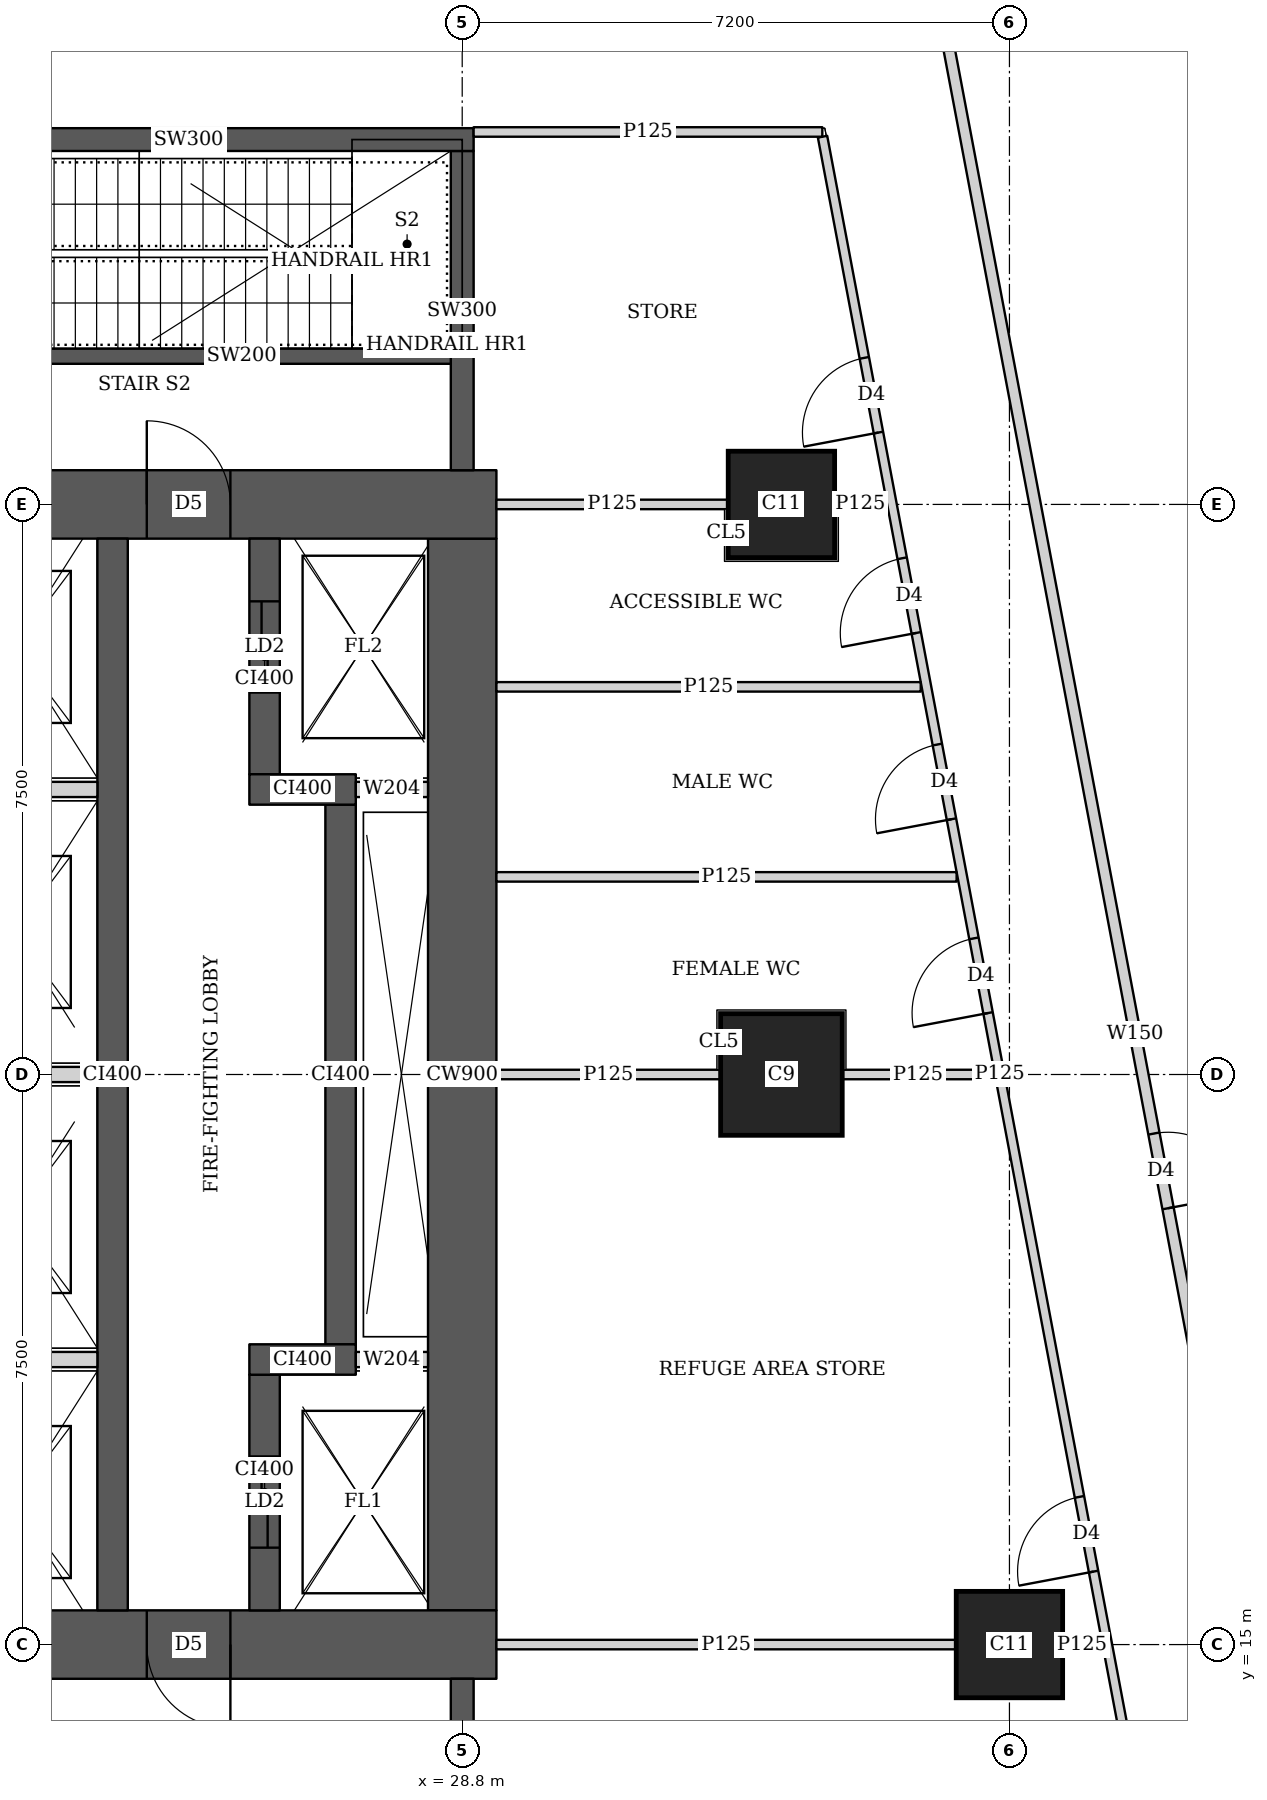
"""IFC4 building model, lengths in metres.
Left out: names, types, materials, properties, quantities, classifications, styles, units other than length and angle.
Written with IfcOpenShell. Run it as: python <this file> out.ifc"""

import sys

from ifc_helpers import new_model, si_unit, direction, frame, frame_2d, origin, origin_2d, place, context, subcontext, project, spatial, rectangle, extrude, element, fill, save


model = new_model("IFC4")
c1 = context("Model", 3, precision=1e-05, world=origin(), true_north=direction((0.0, 1.0)))
c2 = subcontext(c1, "Body", "Model", "MODEL_VIEW")
j1 = project(units=[si_unit("LENGTHUNIT", "METRE"), si_unit("PLANEANGLEUNIT", "RADIAN")], contexts=[c1])
p1 = place(None, origin())
s1 = spatial("IfcSite", under=j1, at=p1, CompositionType="ELEMENT")
p2 = place(p1, origin())
s2 = spatial("IfcBuilding", under=s1, at=p2, CompositionType="ELEMENT")
p3 = place(p2, frame((0.0, 0.0, 246.2)))
s3 = spatial("IfcBuildingStorey", under=s2, at=p3, CompositionType="ELEMENT", Elevation=246.2)
p4 = place(p3, frame((36.0, 15.0, 0.0), z_axis=(0.0, 0.0, 1.0), x_axis=(1.0, 0.0, 0.0)))
e1 = element("IfcColumn", 1, at=p4, inside=s3, PredefinedType="COLUMN", context=c2, shape_type="SweptSolid", body=[
    extrude(rectangle(XDim=1.4, YDim=1.4, at=origin_2d()), origin(), (0.0, 0.0, 1.0), 5.4),
])
p5 = place(p3, frame((33.0, 22.5, 0.0), z_axis=(0.0, 0.0, 1.0), x_axis=(1.0, 0.0, 0.0)))
e2 = element("IfcColumn", 2, at=p5, inside=s3, PredefinedType="COLUMN", context=c2, shape_type="SweptSolid", body=[
    extrude(rectangle(XDim=1.6, YDim=1.6, at=origin_2d()), origin(), (0.0, 0.0, 1.0), 5.4),
])
p6 = place(p3, frame((33.0, 30.0, 0.0), z_axis=(0.0, 0.0, 1.0), x_axis=(1.0, 0.0, 0.0)))
e3 = element("IfcColumn", 3, at=p6, inside=s3, PredefinedType="COLUMN", context=c2, shape_type="SweptSolid", body=[
    extrude(rectangle(XDim=1.4, YDim=1.4, at=origin_2d()), origin(), (0.0, 0.0, 1.0), 5.4),
])
p7 = place(p3, frame((13.95, 15.0, 0.0), z_axis=(0.0, 0.0, 1.0), x_axis=(1.0, 0.0, 0.0)))
e4 = element("IfcWall", 4, at=p7, inside=s3, PredefinedType="SHEAR", context=c2, shape_type="SweptSolid", body=[
    extrude(rectangle(XDim=15.3, YDim=0.9, at=frame_2d((7.65, 0.0))), origin(), (0.0, 0.0, 1.0), 5.4),
])
p8 = place(p7, frame((4.45, 0.0, 0.0)))
e5 = element("IfcOpeningElement", 5, at=p8, cuts=e4, PredefinedType="OPENING", context=c2, shape_type="SweptSolid", body=[
    extrude(rectangle(XDim=1.8, YDim=2.1, at=frame_2d((0.9, 1.05))), frame((0.0, 0.46, 0.0), z_axis=(0.0, -1.0, 0.0), x_axis=(1.0, 0.0, 0.0)), (0.0, 0.0, 1.0), 0.92),
])
p9 = place(p7, frame((10.7, 0.0, 0.0)))
e6 = element("IfcOpeningElement", 6, at=p9, cuts=e4, PredefinedType="OPENING", context=c2, shape_type="SweptSolid", body=[
    extrude(rectangle(XDim=1.1, YDim=2.1, at=frame_2d((0.55, 1.05))), frame((0.0, 0.46, 0.0), z_axis=(0.0, -1.0, 0.0), x_axis=(1.0, 0.0, 0.0)), (0.0, 0.0, 1.0), 0.92),
])
p10 = place(p3, frame((13.95, 30.0, 0.0), z_axis=(0.0, 0.0, 1.0), x_axis=(1.0, 0.0, 0.0)))
e7 = element("IfcWall", 7, at=p10, inside=s3, PredefinedType="SHEAR", context=c2, shape_type="SweptSolid", body=[
    extrude(rectangle(XDim=15.3, YDim=0.9, at=frame_2d((7.65, 0.0))), origin(), (0.0, 0.0, 1.0), 5.4),
])
p11 = place(p10, frame((4.45, 0.0, 0.0)))
e8 = element("IfcOpeningElement", 8, at=p11, cuts=e7, PredefinedType="OPENING", context=c2, shape_type="SweptSolid", body=[
    extrude(rectangle(XDim=1.8, YDim=2.1, at=frame_2d((0.9, 1.05))), frame((0.0, 0.46, 0.0), z_axis=(0.0, -1.0, 0.0), x_axis=(1.0, 0.0, 0.0)), (0.0, 0.0, 1.0), 0.92),
])
p12 = place(p10, frame((10.7, 0.0, 0.0)))
e9 = element("IfcOpeningElement", 9, at=p12, cuts=e7, PredefinedType="OPENING", context=c2, shape_type="SweptSolid", body=[
    extrude(rectangle(XDim=1.1, YDim=2.1, at=frame_2d((0.55, 1.05))), frame((0.0, 0.46, 0.0), z_axis=(0.0, -1.0, 0.0), x_axis=(1.0, 0.0, 0.0)), (0.0, 0.0, 1.0), 0.92),
])
p13 = place(p3, frame((28.8, 15.45, 0.0), z_axis=(0.0, 0.0, 1.0), x_axis=(0.0, 1.0, 0.0)))
e10 = element("IfcWall", 10, at=p13, inside=s3, PredefinedType="SHEAR", context=c2, shape_type="SweptSolid", body=[
    extrude(rectangle(XDim=14.1, YDim=0.9, at=frame_2d((7.05, 0.0))), origin(), (0.0, 0.0, 1.0), 5.4),
])
p14 = place(p3, frame((24.2, 15.45, 0.0), z_axis=(0.0, 0.0, 1.0), x_axis=(0.0, 1.0, 0.0)))
e11 = element("IfcWall", 11, at=p14, inside=s3, PredefinedType="SHEAR", context=c2, shape_type="SweptSolid", body=[
    extrude(rectangle(XDim=14.1, YDim=0.4, at=frame_2d((7.05, 0.0))), origin(), (0.0, 0.0, 1.0), 5.4),
])
p15 = place(p3, frame((26.2, 15.45, 0.0), z_axis=(0.0, 0.0, 1.0), x_axis=(0.0, 1.0, 0.0)))
e12 = element("IfcWall", 12, at=p15, inside=s3, PredefinedType="SHEAR", context=c2, shape_type="SweptSolid", body=[
    extrude(rectangle(XDim=3.1, YDim=0.4, at=frame_2d((1.55, 0.0))), origin(), (0.0, 0.0, 1.0), 5.4),
])
p16 = place(p15, frame((0.825, 0.0, 0.0)))
e13 = element("IfcOpeningElement", 13, at=p16, cuts=e12, PredefinedType="OPENING", context=c2, shape_type="SweptSolid", body=[
    extrude(rectangle(XDim=1.2, YDim=2.1, at=frame_2d((0.6, 1.05))), frame((0.0, 0.21, 0.0), z_axis=(0.0, -1.0, 0.0), x_axis=(1.0, 0.0, 0.0)), (0.0, 0.0, 1.0), 0.42),
])
p17 = place(p3, frame((26.0, 18.75, 0.0), z_axis=(0.0, 0.0, 1.0), x_axis=(1.0, 0.0, 0.0)))
e14 = element("IfcWall", 14, at=p17, inside=s3, PredefinedType="SHEAR", context=c2, shape_type="SweptSolid", body=[
    extrude(rectangle(XDim=1.4, YDim=0.4, at=frame_2d((0.7, 0.0))), origin(), (0.0, 0.0, 1.0), 5.4),
])
p18 = place(p3, frame((27.2, 18.95, 0.0), z_axis=(0.0, 0.0, 1.0), x_axis=(0.0, 1.0, 0.0)))
e15 = element("IfcWall", 15, at=p18, inside=s3, PredefinedType="SHEAR", context=c2, shape_type="SweptSolid", body=[
    extrude(rectangle(XDim=7.1, YDim=0.4, at=frame_2d((3.55, 0.0))), origin(), (0.0, 0.0, 1.0), 5.4),
])
p19 = place(p3, frame((26.0, 26.25, 0.0), z_axis=(0.0, 0.0, 1.0), x_axis=(1.0, 0.0, 0.0)))
e16 = element("IfcWall", 16, at=p19, inside=s3, PredefinedType="SHEAR", context=c2, shape_type="SweptSolid", body=[
    extrude(rectangle(XDim=1.4, YDim=0.4, at=frame_2d((0.7, 0.0))), origin(), (0.0, 0.0, 1.0), 5.4),
])
p20 = place(p3, frame((26.2, 26.45, 0.0), z_axis=(0.0, 0.0, 1.0), x_axis=(0.0, 1.0, 0.0)))
e17 = element("IfcWall", 17, at=p20, inside=s3, PredefinedType="SHEAR", context=c2, shape_type="SweptSolid", body=[
    extrude(rectangle(XDim=3.1, YDim=0.4, at=frame_2d((1.55, 0.0))), origin(), (0.0, 0.0, 1.0), 5.4),
])
p21 = place(p20, frame((1.075, 0.0, 0.0)))
e18 = element("IfcOpeningElement", 18, at=p21, cuts=e17, PredefinedType="OPENING", context=c2, shape_type="SweptSolid", body=[
    extrude(rectangle(XDim=1.2, YDim=2.1, at=frame_2d((0.6, 1.05))), frame((0.0, 0.21, 0.0), z_axis=(0.0, -1.0, 0.0), x_axis=(1.0, 0.0, 0.0)), (0.0, 0.0, 1.0), 0.42),
])
p22 = place(p3, frame((28.8, 10.35, 0.0), z_axis=(0.0, 0.0, 1.0), x_axis=(0.0, 1.0, 0.0)))
e19 = element("IfcWall", 19, at=p22, inside=s3, PredefinedType="SHEAR", context=c2, shape_type="SweptSolid", body=[
    extrude(rectangle(XDim=4.2, YDim=0.3, at=frame_2d((2.1, 0.0))), origin(), (0.0, 0.0, 1.0), 5.4),
])
p23 = place(p3, frame((21.45, 34.8, 0.0), z_axis=(0.0, 0.0, 1.0), x_axis=(1.0, 0.0, 0.0)))
e20 = element("IfcWall", 20, at=p23, inside=s3, PredefinedType="SHEAR", context=c2, shape_type="SweptSolid", body=[
    extrude(rectangle(XDim=7.5, YDim=0.3, at=frame_2d((3.75, 0.0))), origin(), (0.0, 0.0, 1.0), 5.4),
])
p24 = place(p23, frame((0.5, 0.0, 0.0)))
e21 = element("IfcOpeningElement", 21, at=p24, cuts=e20, PredefinedType="OPENING", context=c2, shape_type="SweptSolid", body=[
    extrude(rectangle(XDim=1.1, YDim=2.1, at=frame_2d((0.55, 1.05))), frame((0.0, 0.16, 0.0), z_axis=(0.0, -1.0, 0.0), x_axis=(1.0, 0.0, 0.0)), (0.0, 0.0, 1.0), 0.32),
])
p25 = place(p3, frame((28.8, 30.45, 0.0), z_axis=(0.0, 0.0, 1.0), x_axis=(0.0, 1.0, 0.0)))
e22 = element("IfcWall", 22, at=p25, inside=s3, PredefinedType="SHEAR", context=c2, shape_type="SweptSolid", body=[
    extrude(rectangle(XDim=4.2, YDim=0.3, at=frame_2d((2.1, 0.0))), origin(), (0.0, 0.0, 1.0), 5.4),
])
p26 = place(p3, frame((33.382, 45.65, 0.0), z_axis=(0.0, 0.0, 1.0), x_axis=(0.185582712124, -0.982628646519, 0.0)))
e23 = element("IfcWall", 23, at=p26, inside=s3, PredefinedType="SOLIDWALL", context=c2, shape_type="SweptSolid", body=[
    extrude(rectangle(XDim=46.044, YDim=0.15, at=frame_2d((23.022, 0.0))), origin(), (0.0, 0.0, 1.0), 3.35),
])
p27 = place(p26, frame((24.35, 0.0, 0.0)))
e24 = element("IfcOpeningElement", 24, at=p27, cuts=e23, PredefinedType="OPENING", context=c2, shape_type="SweptSolid", body=[
    extrude(rectangle(XDim=1.0, YDim=2.1, at=frame_2d((0.5, 1.05))), frame((0.0, 0.085, 0.0), z_axis=(0.0, -1.0, 0.0), x_axis=(1.0, 0.0, 0.0)), (0.0, 0.0, 1.0), 0.17),
])
p28 = place(p3, frame((28.95, 34.9, 0.0), z_axis=(0.0, 0.0, 1.0), x_axis=(1.0, 0.0, 0.0)))
e25 = element("IfcWall", 25, at=p28, inside=s3, PredefinedType="PARTITIONING", context=c2, shape_type="SweptSolid", body=[
    extrude(rectangle(XDim=4.588, YDim=0.125, at=frame_2d((2.294, 0.0))), origin(), (0.0, 0.0, 1.0), 2.75),
])
p29 = place(p3, frame((38.202, 10.163, 0.0), z_axis=(0.0, 0.0, 1.0), x_axis=(-0.185610321132, 0.982623431783, 0.0)))
e26 = element("IfcWall", 26, at=p29, inside=s3, PredefinedType="PARTITIONING", context=c2, shape_type="SweptSolid", body=[
    extrude(rectangle(XDim=25.111, YDim=0.125, at=frame_2d((12.556, 0.0))), origin(), (0.0, 0.0, 1.0), 3.55),
])
p30 = place(p29, frame((0.708, 0.0, 0.0)))
e27 = element("IfcOpeningElement", 27, at=p30, cuts=e26, PredefinedType="OPENING", context=c2, shape_type="SweptSolid", body=[
    extrude(rectangle(XDim=1.0, YDim=2.1, at=frame_2d((0.5, 1.05))), frame((0.0, 0.073, 0.0), z_axis=(0.0, -1.0, 0.0), x_axis=(1.0, 0.0, 0.0)), (0.0, 0.0, 1.0), 0.145),
])
p31 = place(p29, frame((5.9, 0.0, 0.0)))
e28 = element("IfcOpeningElement", 28, at=p31, cuts=e26, PredefinedType="OPENING", context=c2, shape_type="SweptSolid", body=[
    extrude(rectangle(XDim=1.0, YDim=2.1, at=frame_2d((0.5, 1.05))), frame((0.0, 0.073, 0.0), z_axis=(0.0, -1.0, 0.0), x_axis=(1.0, 0.0, 0.0)), (0.0, 0.0, 1.0), 0.145),
])
p32 = place(p29, frame((21.15, 0.0, 0.0)))
e29 = element("IfcOpeningElement", 29, at=p32, cuts=e26, PredefinedType="OPENING", context=c2, shape_type="SweptSolid", body=[
    extrude(rectangle(XDim=1.0, YDim=2.1, at=frame_2d((0.5, 1.05))), frame((0.0, 0.073, 0.0), z_axis=(0.0, -1.0, 0.0), x_axis=(1.0, 0.0, 0.0)), (0.0, 0.0, 1.0), 0.145),
])
p33 = place(p29, frame((13.378, 0.0, 0.0)))
e30 = element("IfcOpeningElement", 30, at=p33, cuts=e26, PredefinedType="OPENING", context=c2, shape_type="SweptSolid", body=[
    extrude(rectangle(XDim=1.0, YDim=2.1, at=frame_2d((0.5, 1.05))), frame((0.0, 0.073, 0.0), z_axis=(0.0, -1.0, 0.0), x_axis=(1.0, 0.0, 0.0)), (0.0, 0.0, 1.0), 0.145),
])
p34 = place(p29, frame((15.973, 0.0, 0.0)))
e31 = element("IfcOpeningElement", 31, at=p34, cuts=e26, PredefinedType="OPENING", context=c2, shape_type="SweptSolid", body=[
    extrude(rectangle(XDim=1.0, YDim=2.1, at=frame_2d((0.5, 1.05))), frame((0.0, 0.073, 0.0), z_axis=(0.0, -1.0, 0.0), x_axis=(1.0, 0.0, 0.0)), (0.0, 0.0, 1.0), 0.145),
])
p35 = place(p29, frame((18.467, 0.0, 0.0)))
e32 = element("IfcOpeningElement", 32, at=p35, cuts=e26, PredefinedType="OPENING", context=c2, shape_type="SweptSolid", body=[
    extrude(rectangle(XDim=1.0, YDim=2.1, at=frame_2d((0.5, 1.05))), frame((0.0, 0.073, 0.0), z_axis=(0.0, -1.0, 0.0), x_axis=(1.0, 0.0, 0.0)), (0.0, 0.0, 1.0), 0.145),
])
p36 = place(p3, frame((29.25, 15.0, 0.0), z_axis=(0.0, 0.0, 1.0), x_axis=(1.0, 0.0, 0.0)))
e33 = element("IfcWall", 33, at=p36, inside=s3, PredefinedType="PARTITIONING", context=c2, shape_type="SweptSolid", body=[
    extrude(rectangle(XDim=6.049, YDim=0.125, at=frame_2d((3.024, 0.0))), origin(), (0.0, 0.0, 1.0), 3.55),
])
p37 = place(p3, frame((36.701, 15.0, 0.0), z_axis=(0.0, 0.0, 1.0), x_axis=(1.0, 0.0, 0.0)))
e34 = element("IfcWall", 34, at=p37, inside=s3, PredefinedType="PARTITIONING", context=c2, shape_type="SweptSolid", body=[
    extrude(rectangle(XDim=0.512, YDim=0.125, at=frame_2d((0.256, 0.0))), origin(), (0.0, 0.0, 1.0), 3.55),
])
p38 = place(p3, frame((29.25, 22.5, 0.0), z_axis=(0.0, 0.0, 1.0), x_axis=(1.0, 0.0, 0.0)))
e35 = element("IfcWall", 35, at=p38, inside=s3, PredefinedType="PARTITIONING", context=c2, shape_type="SweptSolid", body=[
    extrude(rectangle(XDim=2.949, YDim=0.125, at=frame_2d((1.475, 0.0))), origin(), (0.0, 0.0, 1.0), 3.55),
])
p39 = place(p3, frame((33.801, 22.5, 0.0), z_axis=(0.0, 0.0, 1.0), x_axis=(1.0, 0.0, 0.0)))
e36 = element("IfcWall", 36, at=p39, inside=s3, PredefinedType="PARTITIONING", context=c2, shape_type="SweptSolid", body=[
    extrude(rectangle(XDim=1.995, YDim=0.125, at=frame_2d((0.998, 0.0))), origin(), (0.0, 0.0, 1.0), 3.55),
])
p40 = place(p3, frame((29.25, 30.0, 0.0), z_axis=(0.0, 0.0, 1.0), x_axis=(1.0, 0.0, 0.0)))
e37 = element("IfcWall", 37, at=p40, inside=s3, PredefinedType="PARTITIONING", context=c2, shape_type="SweptSolid", body=[
    extrude(rectangle(XDim=3.049, YDim=0.125, at=frame_2d((1.524, 0.0))), origin(), (0.0, 0.0, 1.0), 3.55),
])
p41 = place(p3, frame((33.701, 30.0, 0.0), z_axis=(0.0, 0.0, 1.0), x_axis=(1.0, 0.0, 0.0)))
e38 = element("IfcWall", 38, at=p41, inside=s3, PredefinedType="PARTITIONING", context=c2, shape_type="SweptSolid", body=[
    extrude(rectangle(XDim=0.678, YDim=0.125, at=frame_2d((0.339, 0.0))), origin(), (0.0, 0.0, 1.0), 3.55),
])
p42 = place(p3, frame((29.25, 25.1, 0.0), z_axis=(0.0, 0.0, 1.0), x_axis=(1.0, 0.0, 0.0)))
e39 = element("IfcWall", 39, at=p42, inside=s3, PredefinedType="PARTITIONING", context=c2, shape_type="SweptSolid", body=[
    extrude(rectangle(XDim=6.055, YDim=0.125, at=frame_2d((3.027, 0.0))), origin(), (0.0, 0.0, 1.0), 5.15),
])
p43 = place(p3, frame((29.25, 27.6, 0.0), z_axis=(0.0, 0.0, 1.0), x_axis=(1.0, 0.0, 0.0)))
e40 = element("IfcWall", 40, at=p43, inside=s3, PredefinedType="PARTITIONING", context=c2, shape_type="SweptSolid", body=[
    extrude(rectangle(XDim=5.583, YDim=0.125, at=frame_2d((2.792, 0.0))), origin(), (0.0, 0.0, 1.0), 5.15),
])
p44 = place(p3, frame((23.0, 31.95, 0.0), z_axis=(0.0, 0.0, 1.0), x_axis=(1.0, 0.0, 0.0)))
e41 = element("IfcWall", 41, at=p44, inside=s3, PredefinedType="SHEAR", context=c2, shape_type="SweptSolid", body=[
    extrude(rectangle(XDim=5.8, YDim=0.2, at=frame_2d((2.9, 0.0))), origin(), (0.0, 0.0, 1.0), 5.4),
])
for number, where, z_axis, x_axis in (
    (42, (21.8, 18.75, 0.0), (0.0, 0.0, 1.0), (1.0, 0.0, 0.0)),
    (43, (21.8, 22.5, 0.0), (0.0, 0.0, 1.0), (1.0, 0.0, 0.0)),
    (44, (21.8, 26.25, 0.0), (0.0, 0.0, 1.0), (1.0, 0.0, 0.0)),
):
    element("IfcWall", number, at=place(p3, frame(where, z_axis=z_axis, x_axis=x_axis)), inside=s3, PredefinedType="SOLIDWALL", context=c2, shape_type="SweptSolid", body=[
        extrude(rectangle(XDim=2.2, YDim=0.2, at=frame_2d((1.1, 0.0))), origin(), (0.0, 0.0, 1.0), 5.15),
    ])
for number, where, z_axis, x_axis in (
    (45, (27.4, 18.75, 0.0), (0.0, 0.0, 1.0), (1.0, 0.0, 0.0)),
    (46, (27.4, 26.25, 0.0), (0.0, 0.0, 1.0), (1.0, 0.0, 0.0)),
):
    element("IfcWall", number, at=place(p3, frame(where, z_axis=z_axis, x_axis=x_axis)), inside=s3, PredefinedType="SOLIDWALL", context=c2, shape_type="SweptSolid", body=[
        extrude(rectangle(XDim=0.95, YDim=0.2, at=frame_2d((0.475, 0.0))), origin(), (0.0, 0.0, 1.0), 5.15),
    ])
p45 = place(p27, origin())
e47 = element("IfcDoor", 47, at=p45, inside=s3, OperationType="SINGLE_SWING_RIGHT", PredefinedType="DOOR", context=c2, shape_type="SweptSolid", body=[
    extrude(rectangle(XDim=1.0, YDim=2.1, at=frame_2d((0.5, 1.05))), frame((0.0, 0.025, 0.0), z_axis=(0.0, -1.0, 0.0), x_axis=(1.0, 0.0, 0.0)), (0.0, 0.0, 1.0), 0.05),
])
fill(e24, e47)
p46 = place(p31, origin())
e48 = element("IfcDoor", 48, at=p46, inside=s3, OperationType="SINGLE_SWING_LEFT", PredefinedType="DOOR", context=c2, shape_type="SweptSolid", body=[
    extrude(rectangle(XDim=1.0, YDim=2.1, at=frame_2d((0.5, 1.05))), frame((0.0, 0.025, 0.0), z_axis=(0.0, -1.0, 0.0), x_axis=(1.0, 0.0, 0.0)), (0.0, 0.0, 1.0), 0.05),
])
fill(e28, e48)
p47 = place(p32, origin())
e49 = element("IfcDoor", 49, at=p47, inside=s3, OperationType="SINGLE_SWING_LEFT", PredefinedType="DOOR", context=c2, shape_type="SweptSolid", body=[
    extrude(rectangle(XDim=1.0, YDim=2.1, at=frame_2d((0.5, 1.05))), frame((0.0, 0.025, 0.0), z_axis=(0.0, -1.0, 0.0), x_axis=(1.0, 0.0, 0.0)), (0.0, 0.0, 1.0), 0.05),
])
fill(e29, e49)
p48 = place(p33, origin())
e50 = element("IfcDoor", 50, at=p48, inside=s3, OperationType="SINGLE_SWING_LEFT", PredefinedType="DOOR", context=c2, shape_type="SweptSolid", body=[
    extrude(rectangle(XDim=1.0, YDim=2.1, at=frame_2d((0.5, 1.05))), frame((0.0, 0.025, 0.0), z_axis=(0.0, -1.0, 0.0), x_axis=(1.0, 0.0, 0.0)), (0.0, 0.0, 1.0), 0.05),
])
fill(e30, e50)
p49 = place(p34, origin())
e51 = element("IfcDoor", 51, at=p49, inside=s3, OperationType="SINGLE_SWING_LEFT", PredefinedType="DOOR", context=c2, shape_type="SweptSolid", body=[
    extrude(rectangle(XDim=1.0, YDim=2.1, at=frame_2d((0.5, 1.05))), frame((0.0, 0.025, 0.0), z_axis=(0.0, -1.0, 0.0), x_axis=(1.0, 0.0, 0.0)), (0.0, 0.0, 1.0), 0.05),
])
fill(e31, e51)
p50 = place(p35, origin())
e52 = element("IfcDoor", 52, at=p50, inside=s3, OperationType="SINGLE_SWING_LEFT", PredefinedType="DOOR", context=c2, shape_type="SweptSolid", body=[
    extrude(rectangle(XDim=1.0, YDim=2.1, at=frame_2d((0.5, 1.05))), frame((0.0, 0.025, 0.0), z_axis=(0.0, -1.0, 0.0), x_axis=(1.0, 0.0, 0.0)), (0.0, 0.0, 1.0), 0.05),
])
fill(e32, e52)
p51 = place(p9, origin())
e53 = element("IfcDoor", 53, at=p51, inside=s3, OperationType="SINGLE_SWING_LEFT", PredefinedType="DOOR", context=c2, shape_type="SweptSolid", body=[
    extrude(rectangle(XDim=1.1, YDim=2.1, at=frame_2d((0.55, 1.05))), frame((0.0, 0.025, 0.0), z_axis=(0.0, -1.0, 0.0), x_axis=(1.0, 0.0, 0.0)), (0.0, 0.0, 1.0), 0.05),
])
fill(e6, e53)
p52 = place(p12, origin())
e54 = element("IfcDoor", 54, at=p52, inside=s3, OperationType="SINGLE_SWING_LEFT", PredefinedType="DOOR", context=c2, shape_type="SweptSolid", body=[
    extrude(rectangle(XDim=1.1, YDim=2.1, at=frame_2d((0.55, 1.05))), frame((0.0, 0.025, 0.0), z_axis=(0.0, -1.0, 0.0), x_axis=(1.0, 0.0, 0.0)), (0.0, 0.0, 1.0), 0.05),
])
fill(e9, e54)
p53 = place(p16, origin())
e55 = element("IfcDoor", 55, at=p53, inside=s3, OperationType="DOUBLE_DOOR_SLIDING", PredefinedType="DOOR", context=c2, shape_type="SweptSolid", body=[
    extrude(rectangle(XDim=1.2, YDim=2.1, at=frame_2d((0.6, 1.05))), frame((0.0, 0.025, 0.0), z_axis=(0.0, -1.0, 0.0), x_axis=(1.0, 0.0, 0.0)), (0.0, 0.0, 1.0), 0.05),
])
fill(e13, e55)
p54 = place(p21, origin())
e56 = element("IfcDoor", 56, at=p54, inside=s3, OperationType="DOUBLE_DOOR_SLIDING", PredefinedType="DOOR", context=c2, shape_type="SweptSolid", body=[
    extrude(rectangle(XDim=1.2, YDim=2.1, at=frame_2d((0.6, 1.05))), frame((0.0, 0.025, 0.0), z_axis=(0.0, -1.0, 0.0), x_axis=(1.0, 0.0, 0.0)), (0.0, 0.0, 1.0), 0.05),
])
fill(e18, e56)
save(model, sys.argv[1])
